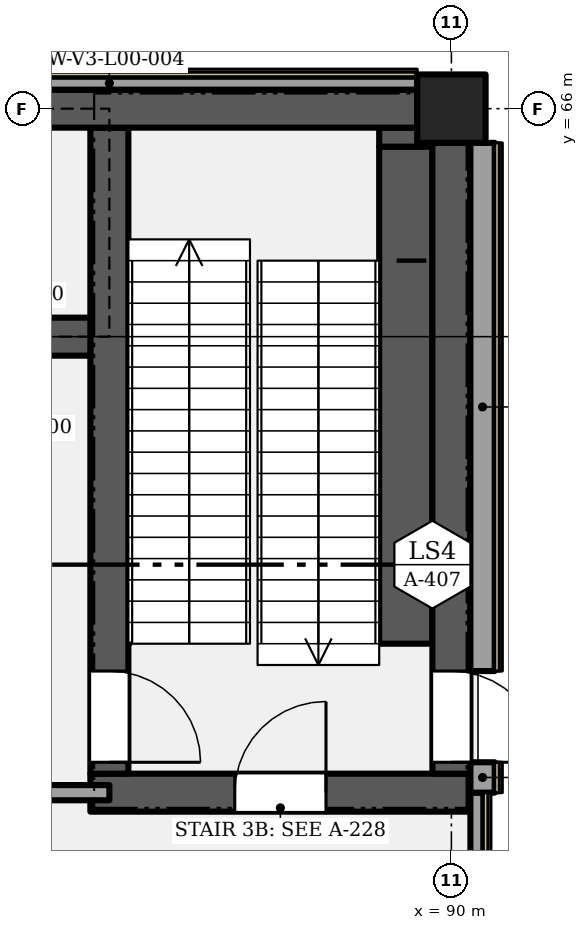
"""IFC4 building model, lengths in metres.
Left out: names, types, materials, properties, quantities, classifications, styles, units other than length and angle.
Written with IfcOpenShell. Run it as: python <this file> out.ifc"""

import sys

from ifc_helpers import new_model, si_unit, direction, frame, frame_2d, origin, origin_2d, place, context, subcontext, project, spatial, rectangle, extrude, element, fill, save


model = new_model("IFC4")
c1 = context("Model", 3, precision=1e-05, world=origin(), true_north=direction((0.0, 1.0)))
c2 = subcontext(c1, "Body", "Model", "MODEL_VIEW")
j1 = project(units=[si_unit("LENGTHUNIT", "METRE"), si_unit("PLANEANGLEUNIT", "RADIAN")], contexts=[c1])
p1 = place(None, origin())
s1 = spatial("IfcSite", under=j1, at=p1, CompositionType="ELEMENT")
p2 = place(p1, origin())
s2 = spatial("IfcBuilding", under=s1, at=p2, CompositionType="ELEMENT")
p3 = place(p2, origin())
s3 = spatial("IfcBuildingStorey", under=s2, at=p3, CompositionType="ELEMENT", Elevation=0.0)
p4 = place(p3, frame((90.0, 66.0, 0.0), z_axis=(0.0, 0.0, 1.0), x_axis=(1.0, 0.0, 0.0)))
e1 = element("IfcColumn", 1, at=p4, inside=s3, PredefinedType="COLUMN", context=c2, shape_type="SweptSolid", body=[
    extrude(rectangle(XDim=0.9, YDim=0.9, at=origin_2d()), origin(), (0.0, 0.0, 1.0), 6.6),
])
p5 = place(p3, frame((85.25, 57.0, 0.0), z_axis=(0.0, 0.0, 1.0), x_axis=(1.0, 0.0, 0.0)))
e2 = element("IfcWall", 2, at=p5, inside=s3, PredefinedType="SHEAR", context=c2, shape_type="SweptSolid", body=[
    extrude(rectangle(XDim=5.0, YDim=0.5, at=frame_2d((2.5, 0.0))), origin(), (0.0, 0.0, 1.0), 6.3),
])
p6 = place(p5, frame((1.9, 0.0, 0.0)))
e3 = element("IfcOpeningElement", 3, at=p6, cuts=e2, PredefinedType="OPENING", context=c2, shape_type="SweptSolid", body=[
    extrude(rectangle(XDim=1.2, YDim=2.1, at=frame_2d((0.6, 1.05))), frame((0.0, 0.26, 0.0), z_axis=(0.0, -1.0, 0.0), x_axis=(1.0, 0.0, 0.0)), (0.0, 0.0, 1.0), 0.52),
])
p7 = place(p3, frame((85.5, 57.25, 0.0), z_axis=(0.0, 0.0, 1.0), x_axis=(0.0, 1.0, 0.0)))
e4 = element("IfcWall", 4, at=p7, inside=s3, PredefinedType="SHEAR", context=c2, shape_type="SweptSolid", body=[
    extrude(rectangle(XDim=8.5, YDim=0.5, at=frame_2d((4.25, 0.0))), origin(), (0.0, 0.0, 1.0), 6.3),
])
p8 = place(p7, frame((1.35, 0.0, 0.0), z_axis=(0.0, 0.0, 1.0), x_axis=(-1.0, 0.0, 0.0)))
e5 = element("IfcOpeningElement", 5, at=p8, cuts=e4, PredefinedType="OPENING", context=c2, shape_type="SweptSolid", body=[
    extrude(rectangle(XDim=1.2, YDim=2.1, at=frame_2d((0.6, 1.05))), frame((0.0, 0.26, 0.0), z_axis=(0.0, -1.0, 0.0), x_axis=(1.0, 0.0, 0.0)), (0.0, 0.0, 1.0), 0.52),
])
p9 = place(p3, frame((90.0, 57.25, 0.0), z_axis=(0.0, 0.0, 1.0), x_axis=(0.0, 1.0, 0.0)))
e6 = element("IfcWall", 6, at=p9, inside=s3, PredefinedType="SHEAR", context=c2, shape_type="SweptSolid", body=[
    extrude(rectangle(XDim=8.3, YDim=0.5, at=frame_2d((4.15, 0.0))), origin(), (0.0, 0.0, 1.0), 6.3),
])
p10 = place(p9, frame((1.35, 0.0, 0.0), z_axis=(0.0, 0.0, 1.0), x_axis=(-1.0, 0.0, 0.0)))
e7 = element("IfcOpeningElement", 7, at=p10, cuts=e6, PredefinedType="OPENING", context=c2, shape_type="SweptSolid", body=[
    extrude(rectangle(XDim=1.2, YDim=2.1, at=frame_2d((0.6, 1.05))), frame((0.0, 0.26, 0.0), z_axis=(0.0, -1.0, 0.0), x_axis=(1.0, 0.0, 0.0)), (0.0, 0.0, 1.0), 0.52),
])
p11 = place(p3, frame((79.25, 63.0, 0.0), z_axis=(0.0, 0.0, 1.0), x_axis=(1.0, 0.0, 0.0)))
e8 = element("IfcWall", 8, at=p11, inside=s3, PredefinedType="SHEAR", context=c2, shape_type="SweptSolid", body=[
    extrude(rectangle(XDim=6.0, YDim=0.5, at=frame_2d((3.0, 0.0))), origin(), (0.0, 0.0, 1.0), 6.3),
])
p12 = place(p11, frame((4.2, 0.0, 0.0)))
e9 = element("IfcOpeningElement", 9, at=p12, cuts=e8, PredefinedType="OPENING", context=c2, shape_type="SweptSolid", body=[
    extrude(rectangle(XDim=1.1, YDim=2.1, at=frame_2d((0.55, 1.05))), frame((0.0, 0.26, 0.0), z_axis=(0.0, -1.0, 0.0), x_axis=(1.0, 0.0, 0.0)), (0.0, 0.0, 1.0), 0.52),
])
p13 = place(p3, frame((82.25, 66.0, 0.0), z_axis=(0.0, 0.0, 1.0), x_axis=(1.0, 0.0, 0.0)))
e10 = element("IfcWall", 10, at=p13, inside=s3, PredefinedType="SHEAR", context=c2, shape_type="SweptSolid", body=[
    extrude(rectangle(XDim=7.3, YDim=0.5, at=frame_2d((3.65, 0.0))), origin(), (0.0, 0.0, 1.0), 6.3),
])
p14 = place(p3, frame((81.45, 66.335, 0.0), z_axis=(0.0, 0.0, 1.0), x_axis=(1.0, 0.0, 0.0)))
e11 = element("IfcWall", 11, at=p14, inside=s3, PredefinedType="SOLIDWALL", context=c2, shape_type="SweptSolid", body=[
    extrude(rectangle(XDim=8.1, YDim=0.17, at=frame_2d((4.05, 0.0))), origin(), (0.0, 0.0, 1.0), 6.3),
])
p15 = place(p3, frame((90.335, 54.45, 0.0), z_axis=(0.0, 0.0, 1.0), x_axis=(0.0, 1.0, 0.0)))
e12 = element("IfcWall", 12, at=p15, inside=s3, PredefinedType="SOLIDWALL", context=c2, shape_type="SweptSolid", body=[
    extrude(rectangle(XDim=2.55, YDim=0.17, at=frame_2d((1.275, 0.0))), origin(), (0.0, 0.0, 1.0), 6.3),
])
p16 = place(p3, frame((90.41, 57.0, 0.0), z_axis=(0.0, 0.0, 1.0), x_axis=(0.0, 1.0, 0.0)))
e13 = element("IfcWall", 13, at=p16, inside=s3, PredefinedType="SOLIDWALL", context=c2, shape_type="SweptSolid", body=[
    extrude(rectangle(XDim=0.4, YDim=0.32, at=frame_2d((0.2, 0.0))), origin(), (0.0, 0.0, 1.0), 6.3),
])
p17 = place(p3, frame((90.41, 58.6, 0.0), z_axis=(0.0, 0.0, 1.0), x_axis=(0.0, 1.0, 0.0)))
e14 = element("IfcWall", 14, at=p17, inside=s3, PredefinedType="SOLIDWALL", context=c2, shape_type="SweptSolid", body=[
    extrude(rectangle(XDim=6.95, YDim=0.32, at=frame_2d((3.475, 0.0))), origin(), (0.0, 0.0, 1.0), 6.3),
])
p18 = place(p3, frame((76.5, 57.0, 0.0), z_axis=(0.0, 0.0, 1.0), x_axis=(1.0, 0.0, 0.0)))
e15 = element("IfcWall", 15, at=p18, inside=s3, PredefinedType="PARTITIONING", context=c2, shape_type="SweptSolid", body=[
    extrude(rectangle(XDim=9.0, YDim=0.2, at=frame_2d((4.5, 0.0))), origin(), (0.0, 0.0, 1.0), 6.3),
])
p19 = place(p18, frame((0.9, 0.0, 0.0)))
e16 = element("IfcOpeningElement", 16, at=p19, cuts=e15, PredefinedType="OPENING", context=c2, shape_type="SweptSolid", body=[
    extrude(rectangle(XDim=1.8, YDim=2.1, at=frame_2d((0.9, 1.05))), frame((0.0, 0.11, 0.0), z_axis=(0.0, -1.0, 0.0), x_axis=(1.0, 0.0, 0.0)), (0.0, 0.0, 1.0), 0.22),
])
p20 = place(p18, frame((6.9, 0.0, 0.0)))
e17 = element("IfcOpeningElement", 17, at=p20, cuts=e15, PredefinedType="OPENING", context=c2, shape_type="SweptSolid", body=[
    extrude(rectangle(XDim=1.2, YDim=2.1, at=frame_2d((0.6, 1.05))), frame((0.0, 0.11, 0.0), z_axis=(0.0, -1.0, 0.0), x_axis=(1.0, 0.0, 0.0)), (0.0, 0.0, 1.0), 0.22),
])
p21 = place(p3, frame((89.4, 58.96, 0.0), z_axis=(0.0, 0.0, 1.0), x_axis=(0.0, 1.0, 0.0)))
e18 = element("IfcWall", 18, at=p21, inside=s3, PredefinedType="SHEAR", context=c2, shape_type="SweptSolid", body=[
    extrude(rectangle(XDim=6.54, YDim=0.7, at=frame_2d((3.27, 0.0))), origin(), (0.0, 0.0, 1.0), 3.1),
])
p22 = place(p3, frame((89.35, 65.5, 0.0), z_axis=(0.0, 0.0, 1.0), x_axis=(0.0, 1.0, 0.0)))
e19 = element("IfcWall", 19, at=p22, inside=s3, PredefinedType="SHEAR", context=c2, shape_type="SweptSolid", body=[
    extrude(rectangle(XDim=0.25, YDim=0.6, at=frame_2d((0.125, 0.0))), origin(), (0.0, 0.0, 1.0), 3.1),
])
p23 = place(p10, origin())
e20 = element("IfcDoor", 20, at=p23, inside=s3, OperationType="SINGLE_SWING_LEFT", PredefinedType="DOOR", context=c2, shape_type="SweptSolid", body=[
    extrude(rectangle(XDim=1.2, YDim=2.1, at=frame_2d((0.6, 1.05))), frame((0.0, 0.025, 0.0), z_axis=(0.0, -1.0, 0.0), x_axis=(1.0, 0.0, 0.0)), (0.0, 0.0, 1.0), 0.05),
])
fill(e7, e20)
p24 = place(p8, origin())
e21 = element("IfcDoor", 21, at=p24, inside=s3, OperationType="SINGLE_SWING_RIGHT", PredefinedType="DOOR", context=c2, shape_type="SweptSolid", body=[
    extrude(rectangle(XDim=1.2, YDim=2.1, at=frame_2d((0.6, 1.05))), frame((0.0, 0.025, 0.0), z_axis=(0.0, -1.0, 0.0), x_axis=(1.0, 0.0, 0.0)), (0.0, 0.0, 1.0), 0.05),
])
fill(e5, e21)
p25 = place(p6, origin())
e22 = element("IfcDoor", 22, at=p25, inside=s3, OperationType="SINGLE_SWING_RIGHT", PredefinedType="DOOR", context=c2, shape_type="SweptSolid", body=[
    extrude(rectangle(XDim=1.2, YDim=2.1, at=frame_2d((0.6, 1.05))), frame((0.0, 0.025, 0.0), z_axis=(0.0, -1.0, 0.0), x_axis=(1.0, 0.0, 0.0)), (0.0, 0.0, 1.0), 0.05),
])
fill(e3, e22)
save(model, sys.argv[1])
